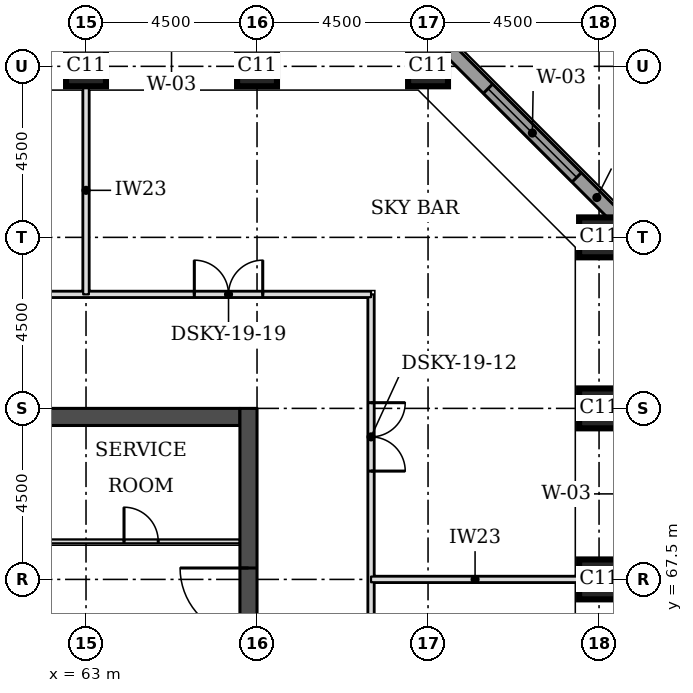
"""IFC4 building model, lengths in metres.
Left out: names, types, materials, properties, quantities, classifications, styles, units other than length and angle.
Written with IfcOpenShell. Run it as: python <this file> out.ifc"""

import sys

from ifc_helpers import new_model, si_unit, direction, frame, frame_2d, origin, origin_2d, place, context, subcontext, project, spatial, rectangle, extrude, element, fill, save


model = new_model("IFC4")
c1 = context("Model", 3, precision=1e-05, world=origin(), true_north=direction((0.0, 1.0)))
c2 = subcontext(c1, "Body", "Model", "MODEL_VIEW")
j1 = project(units=[si_unit("LENGTHUNIT", "METRE"), si_unit("PLANEANGLEUNIT", "RADIAN")], contexts=[c1])
p1 = place(None, origin())
s1 = spatial("IfcSite", under=j1, at=p1, CompositionType="ELEMENT")
p2 = place(p1, origin())
s2 = spatial("IfcBuilding", under=s1, at=p2, CompositionType="ELEMENT")
p3 = place(p2, frame((0.0, 0.0, 74.3)))
s3 = spatial("IfcBuildingStorey", under=s2, at=p3, CompositionType="ELEMENT", Elevation=74.3)
for number, where, z_axis, x_axis in (
    (1, (76.5, 67.5, 0.0), (0.0, 0.0, 1.0), (1.0, 0.0, 0.0)),
    (2, (76.5, 72.0, 0.0), (0.0, 0.0, 1.0), (1.0, 0.0, 0.0)),
    (3, (76.5, 76.5, 0.0), (0.0, 0.0, 1.0), (1.0, 0.0, 0.0)),
    (4, (63.0, 81.0, 0.0), (0.0, 0.0, 1.0), (1.0, 0.0, 0.0)),
    (5, (67.5, 81.0, 0.0), (0.0, 0.0, 1.0), (1.0, 0.0, 0.0)),
    (6, (72.0, 81.0, 0.0), (0.0, 0.0, 1.0), (1.0, 0.0, 0.0)),
):
    element("IfcColumn", number, at=place(p3, frame(where, z_axis=z_axis, x_axis=x_axis)), inside=s3, PredefinedType="COLUMN", context=c2, shape_type="SweptSolid", body=[
        extrude(rectangle(XDim=1.05, YDim=1.05, at=origin_2d()), origin(), (0.0, 0.0, 1.0), 4.6),
    ])
p4 = place(p3, frame((45.45, 71.775, 0.0), z_axis=(0.0, 0.0, 1.0), x_axis=(1.0, 0.0, 0.0)))
e7 = element("IfcWall", 7, at=p4, inside=s3, PredefinedType="SHEAR", context=c2, shape_type="SweptSolid", body=[
    extrude(rectangle(XDim=21.6, YDim=0.45, at=frame_2d((10.8, 0.0))), origin(), (0.0, 0.0, 1.0), 4.6),
])
p5 = place(p3, frame((67.275, 49.5, 0.0), z_axis=(0.0, 0.0, 1.0), x_axis=(0.0, 1.0, 0.0)))
e8 = element("IfcWall", 8, at=p5, inside=s3, PredefinedType="SHEAR", context=c2, shape_type="SweptSolid", body=[
    extrude(rectangle(XDim=22.5, YDim=0.45, at=frame_2d((11.25, 0.0))), origin(), (0.0, 0.0, 1.0), 4.6),
])
p6 = place(p5, frame((4.2, 0.0, 0.0)))
e9 = element("IfcOpeningElement", 9, at=p6, cuts=e8, PredefinedType="OPENING", context=c2, shape_type="SweptSolid", body=[
    extrude(rectangle(XDim=1.8, YDim=2.1, at=frame_2d((0.9, 1.05))), frame((0.0, 0.235, 0.0), z_axis=(0.0, -1.0, 0.0), x_axis=(1.0, 0.0, 0.0)), (0.0, 0.0, 1.0), 0.47),
])
p7 = place(p5, frame((6.9, 0.0, 0.0)))
e10 = element("IfcOpeningElement", 10, at=p7, cuts=e8, PredefinedType="OPENING", context=c2, shape_type="SweptSolid", body=[
    extrude(rectangle(XDim=1.1, YDim=2.1, at=frame_2d((0.55, 1.05))), frame((0.0, 0.235, 0.0), z_axis=(0.0, -1.0, 0.0), x_axis=(1.0, 0.0, 0.0)), (0.0, 0.0, 1.0), 0.47),
])
p8 = place(p5, frame((13.6, 0.0, 0.0)))
e11 = element("IfcOpeningElement", 11, at=p8, cuts=e8, PredefinedType="OPENING", context=c2, shape_type="SweptSolid", body=[
    extrude(rectangle(XDim=1.1, YDim=2.1, at=frame_2d((0.55, 1.05))), frame((0.0, 0.235, 0.0), z_axis=(0.0, -1.0, 0.0), x_axis=(1.0, 0.0, 0.0)), (0.0, 0.0, 1.0), 0.47),
])
p9 = place(p5, frame((16.5, 0.0, 0.0)))
e12 = element("IfcOpeningElement", 12, at=p9, cuts=e8, PredefinedType="OPENING", context=c2, shape_type="SweptSolid", body=[
    extrude(rectangle(XDim=1.8, YDim=2.1, at=frame_2d((0.9, 1.05))), frame((0.0, 0.235, 0.0), z_axis=(0.0, -1.0, 0.0), x_axis=(1.0, 0.0, 0.0)), (0.0, 0.0, 1.0), 0.47),
])
p10 = place(p3, frame((77.251, 76.739, 0.0), z_axis=(0.0, 0.0, 1.0), x_axis=(-0.707106781187, 0.707106781187, 0.0)))
e13 = element("IfcWall", 13, at=p10, inside=s3, PredefinedType="STANDARD", context=c2, shape_type="SweptSolid", body=[
    extrude(rectangle(XDim=7.089, YDim=0.35, at=frame_2d((3.544, 0.0))), origin(), (0.0, 0.0, 1.0), 4.425),
])
p11 = place(p10, frame((1.894, 0.0, 0.9)))
e14 = element("IfcOpeningElement", 14, at=p11, cuts=e13, PredefinedType="OPENING", context=c2, shape_type="SweptSolid", body=[
    extrude(rectangle(XDim=3.3, YDim=2.7, at=frame_2d((1.65, 1.35))), frame((0.0, 0.185, 0.0), z_axis=(0.0, -1.0, 0.0), x_axis=(1.0, 0.0, 0.0)), (0.0, 0.0, 1.0), 0.37),
])
p12 = place(p3, frame((70.5, 46.5, 0.0), z_axis=(0.0, 0.0, 1.0), x_axis=(0.0, 1.0, 0.0)))
e15 = element("IfcWall", 15, at=p12, inside=s3, PredefinedType="PARTITIONING", context=c2, shape_type="SweptSolid", body=[
    extrude(rectangle(XDim=28.5, YDim=0.15, at=frame_2d((14.25, 0.0))), origin(), (0.0, 0.0, 1.0), 4.45),
])
p13 = place(p12, frame((7.05, 0.0, 0.0)))
e16 = element("IfcOpeningElement", 16, at=p13, cuts=e15, PredefinedType="OPENING", context=c2, shape_type="SweptSolid", body=[
    extrude(rectangle(XDim=0.9, YDim=2.1, at=frame_2d((0.45, 1.05))), frame((0.0, 0.085, 0.0), z_axis=(0.0, -1.0, 0.0), x_axis=(1.0, 0.0, 0.0)), (0.0, 0.0, 1.0), 0.17),
])
p14 = place(p12, frame((16.05, 0.0, 0.0)))
e17 = element("IfcOpeningElement", 17, at=p14, cuts=e15, PredefinedType="OPENING", context=c2, shape_type="SweptSolid", body=[
    extrude(rectangle(XDim=0.9, YDim=2.1, at=frame_2d((0.45, 1.05))), frame((0.0, 0.085, 0.0), z_axis=(0.0, -1.0, 0.0), x_axis=(1.0, 0.0, 0.0)), (0.0, 0.0, 1.0), 0.17),
])
p15 = place(p12, frame((23.85, 0.0, 0.0)))
e18 = element("IfcOpeningElement", 18, at=p15, cuts=e15, PredefinedType="OPENING", context=c2, shape_type="SweptSolid", body=[
    extrude(rectangle(XDim=1.8, YDim=2.4, at=frame_2d((0.9, 1.2))), frame((0.0, 0.085, 0.0), z_axis=(0.0, -1.0, 0.0), x_axis=(1.0, 0.0, 0.0)), (0.0, 0.0, 1.0), 0.17),
])
p16 = place(p3, frame((42.0, 75.0, 0.0), z_axis=(0.0, 0.0, 1.0), x_axis=(1.0, 0.0, 0.0)))
e19 = element("IfcWall", 19, at=p16, inside=s3, PredefinedType="PARTITIONING", context=c2, shape_type="SweptSolid", body=[
    extrude(rectangle(XDim=28.5, YDim=0.15, at=frame_2d((14.25, 0.0))), origin(), (0.0, 0.0, 1.0), 4.45),
])
p17 = place(p16, frame((23.85, 0.0, 0.0)))
e20 = element("IfcOpeningElement", 20, at=p17, cuts=e19, PredefinedType="OPENING", context=c2, shape_type="SweptSolid", body=[
    extrude(rectangle(XDim=1.8, YDim=2.4, at=frame_2d((0.9, 1.2))), frame((0.0, 0.085, 0.0), z_axis=(0.0, -1.0, 0.0), x_axis=(1.0, 0.0, 0.0)), (0.0, 0.0, 1.0), 0.17),
])
p18 = place(p16, frame((7.05, 0.0, 0.0)))
e21 = element("IfcOpeningElement", 21, at=p18, cuts=e19, PredefinedType="OPENING", context=c2, shape_type="SweptSolid", body=[
    extrude(rectangle(XDim=0.9, YDim=2.1, at=frame_2d((0.45, 1.05))), frame((0.0, 0.085, 0.0), z_axis=(0.0, -1.0, 0.0), x_axis=(1.0, 0.0, 0.0)), (0.0, 0.0, 1.0), 0.17),
])
p19 = place(p16, frame((16.05, 0.0, 0.0)))
e22 = element("IfcOpeningElement", 22, at=p19, cuts=e19, PredefinedType="OPENING", context=c2, shape_type="SweptSolid", body=[
    extrude(rectangle(XDim=0.9, YDim=2.1, at=frame_2d((0.45, 1.05))), frame((0.0, 0.085, 0.0), z_axis=(0.0, -1.0, 0.0), x_axis=(1.0, 0.0, 0.0)), (0.0, 0.0, 1.0), 0.17),
])
for number, where, z_axis, x_axis in (
    (23, (70.5, 67.5, 0.0), (0.0, 0.0, 1.0), (1.0, 0.0, 0.0)),
    (24, (63.0, 75.0, 0.0), (0.0, 0.0, 1.0), (0.0, 1.0, 0.0)),
):
    element("IfcWall", number, at=place(p3, frame(where, z_axis=z_axis, x_axis=x_axis)), inside=s3, PredefinedType="PARTITIONING", context=c2, shape_type="SweptSolid", body=[
        extrude(rectangle(XDim=5.475, YDim=0.15, at=frame_2d((2.738, 0.0))), origin(), (0.0, 0.0, 1.0), 4.45),
    ])
p20 = place(p3, frame((61.85, 68.5, 0.0), z_axis=(0.0, 0.0, 1.0), x_axis=(1.0, 0.0, 0.0)))
e25 = element("IfcWall", 25, at=p20, inside=s3, PredefinedType="PARTITIONING", context=c2, shape_type="SweptSolid", body=[
    extrude(rectangle(XDim=5.2, YDim=0.1, at=frame_2d((2.6, 0.0))), origin(), (0.0, 0.0, 1.0), 4.45),
])
p21 = place(p20, frame((2.15, 0.0, 0.0)))
e26 = element("IfcOpeningElement", 26, at=p21, cuts=e25, PredefinedType="OPENING", context=c2, shape_type="SweptSolid", body=[
    extrude(rectangle(XDim=0.9, YDim=2.1, at=frame_2d((0.45, 1.05))), frame((0.0, 0.06, 0.0), z_axis=(0.0, -1.0, 0.0), x_axis=(1.0, 0.0, 0.0)), (0.0, 0.0, 1.0), 0.12),
])
p22 = place(p11, origin())
e27 = element("IfcWindow", 27, at=p22, inside=s3, PartitioningType="SINGLE_PANEL", PredefinedType="WINDOW", context=c2, shape_type="SweptSolid", body=[
    extrude(rectangle(XDim=3.3, YDim=2.7, at=frame_2d((1.65, 1.35))), frame((0.0, 0.085, 0.0), z_axis=(0.0, -1.0, 0.0), x_axis=(1.0, 0.0, 0.0)), (0.0, 0.0, 1.0), 0.06),
])
fill(e14, e27)
p23 = place(p15, frame((1.8, 0.0, 0.0), z_axis=(0.0, 0.0, 1.0), x_axis=(-1.0, 0.0, 0.0)))
e28 = element("IfcDoor", 28, at=p23, inside=s3, OperationType="DOUBLE_DOOR_SINGLE_SWING", PredefinedType="DOOR", context=c2, shape_type="SweptSolid", body=[
    extrude(rectangle(XDim=1.8, YDim=2.4, at=frame_2d((0.9, 1.2))), frame((0.0, 0.025, 0.0), z_axis=(0.0, -1.0, 0.0), x_axis=(1.0, 0.0, 0.0)), (0.0, 0.0, 1.0), 0.05),
])
fill(e18, e28)
p24 = place(p17, origin())
e29 = element("IfcDoor", 29, at=p24, inside=s3, OperationType="DOUBLE_DOOR_SINGLE_SWING", PredefinedType="DOOR", context=c2, shape_type="SweptSolid", body=[
    extrude(rectangle(XDim=1.8, YDim=2.4, at=frame_2d((0.9, 1.2))), frame((0.0, 0.025, 0.0), z_axis=(0.0, -1.0, 0.0), x_axis=(1.0, 0.0, 0.0)), (0.0, 0.0, 1.0), 0.05),
])
fill(e20, e29)
p25 = place(p9, origin())
e30 = element("IfcDoor", 30, at=p25, inside=s3, OperationType="SINGLE_SWING_RIGHT", PredefinedType="DOOR", context=c2, shape_type="SweptSolid", body=[
    extrude(rectangle(XDim=1.8, YDim=2.1, at=frame_2d((0.9, 1.05))), frame((0.0, 0.025, 0.0), z_axis=(0.0, -1.0, 0.0), x_axis=(1.0, 0.0, 0.0)), (0.0, 0.0, 1.0), 0.05),
])
fill(e12, e30)
p26 = place(p21, origin())
e31 = element("IfcDoor", 31, at=p26, inside=s3, OperationType="SINGLE_SWING_LEFT", PredefinedType="DOOR", context=c2, shape_type="SweptSolid", body=[
    extrude(rectangle(XDim=0.9, YDim=2.1, at=frame_2d((0.45, 1.05))), frame((0.0, 0.025, 0.0), z_axis=(0.0, -1.0, 0.0), x_axis=(1.0, 0.0, 0.0)), (0.0, 0.0, 1.0), 0.05),
])
fill(e26, e31)
save(model, sys.argv[1])
